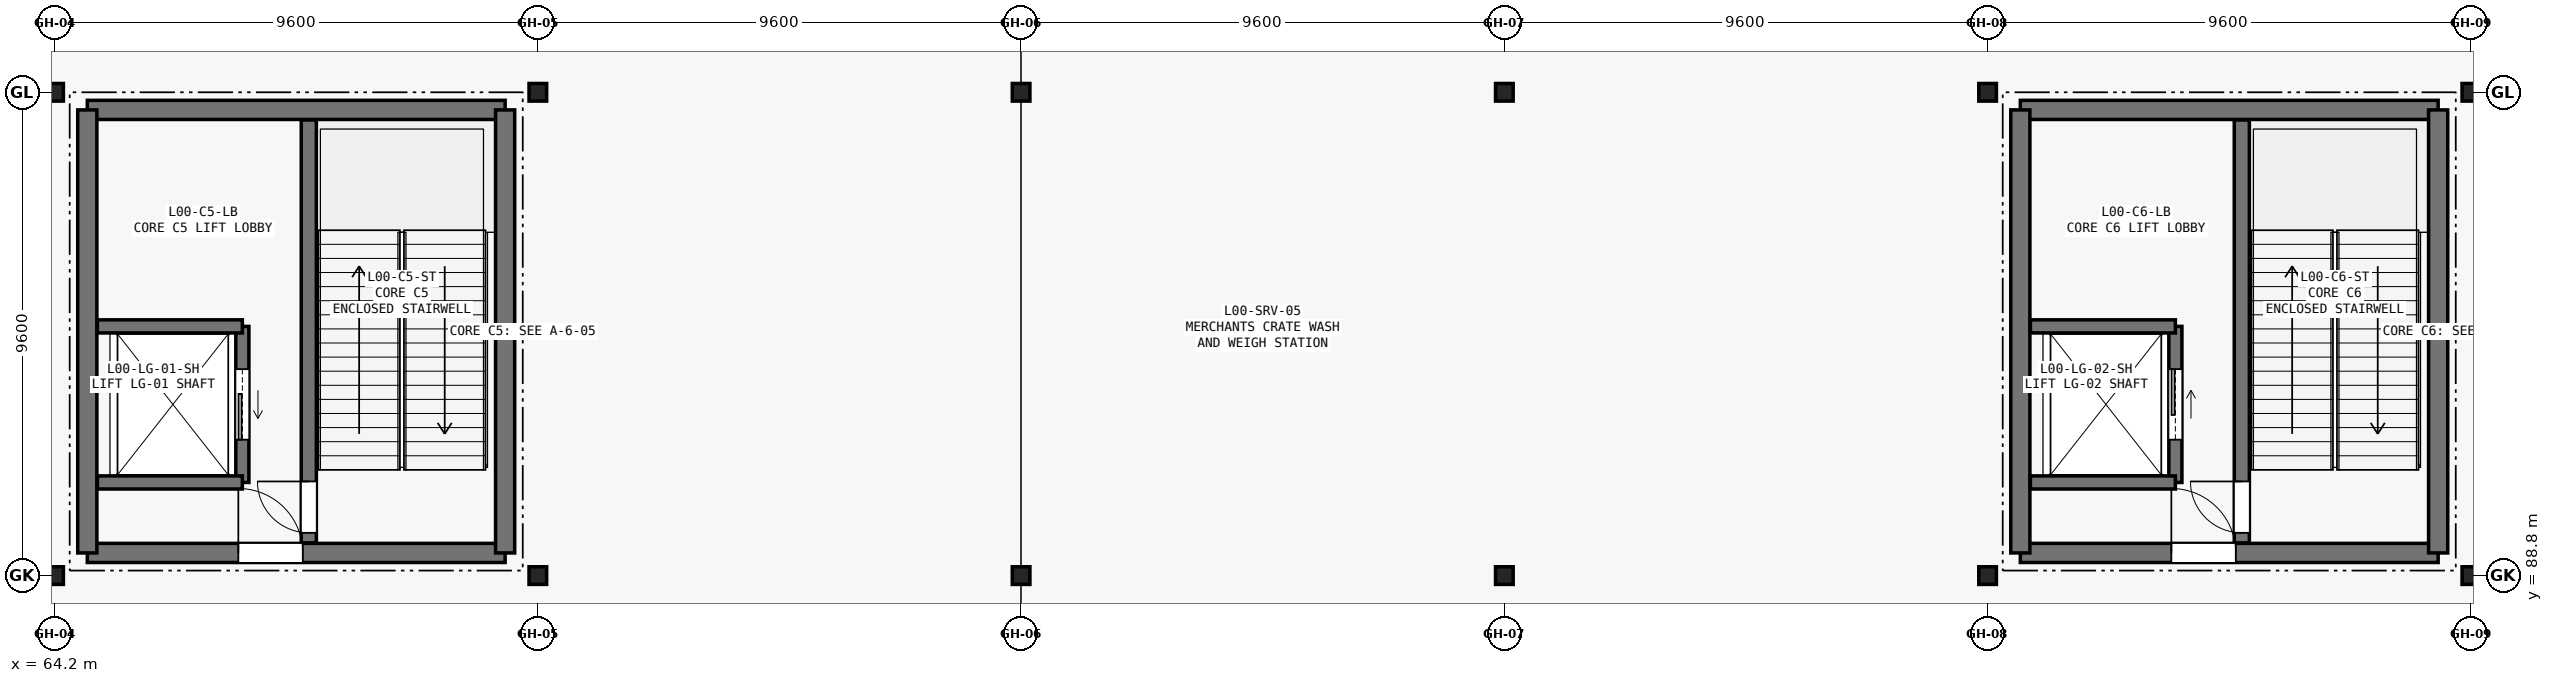
"""IFC4 building model, lengths in metres.
Left out: names, types, materials, properties, quantities, classifications, styles, units other than length and angle.
Written with IfcOpenShell. Run it as: python <this file> out.ifc"""

import sys

from ifc_helpers import new_model, si_unit, direction, frame, frame_2d, origin, origin_2d, place, context, subcontext, project, spatial, rectangle, hollow_rectangle, i_section, extrude, element, fill, save


model = new_model("IFC4")
c1 = context("Model", 3, precision=1e-05, world=origin(), true_north=direction((0.0, 1.0)))
c2 = subcontext(c1, "Body", "Model", "MODEL_VIEW")
j1 = project(units=[si_unit("LENGTHUNIT", "METRE"), si_unit("PLANEANGLEUNIT", "RADIAN")], contexts=[c1])
p1 = place(None, origin())
s1 = spatial("IfcSite", under=j1, at=p1, CompositionType="ELEMENT")
p2 = place(p1, origin())
s2 = spatial("IfcBuilding", under=s1, at=p2, CompositionType="ELEMENT")
p3 = place(p2, origin())
s3 = spatial("IfcBuildingStorey", under=s2, at=p3, CompositionType="ELEMENT", Elevation=0.0)
for number, where, z_axis, x_axis in (
    (1, (64.2, 88.8, 0.0), (0.0, 0.0, 1.0), (1.0, 0.0, 0.0)),
    (2, (64.2, 98.4, 0.0), (0.0, 0.0, 1.0), (1.0, 0.0, 0.0)),
    (3, (73.8, 88.8, 0.0), (0.0, 0.0, 1.0), (1.0, 0.0, 0.0)),
    (4, (73.8, 98.4, 0.0), (0.0, 0.0, 1.0), (1.0, 0.0, 0.0)),
):
    element("IfcColumn", number, at=place(p3, frame(where, z_axis=z_axis, x_axis=x_axis)), inside=s3, PredefinedType="COLUMN", context=c2, shape_type="SweptSolid", body=[
        extrude(i_section(OverallWidth=0.35, OverallDepth=0.35, WebThickness=0.012, FlangeThickness=0.019, FilletRadius=0.02, at=origin_2d()), origin(), (0.0, 0.0, 1.0), 6.0),
    ])
for number, where, z_axis, x_axis in (
    (5, (83.4, 88.8, 0.0), (0.0, 0.0, 1.0), (1.0, 0.0, 0.0)),
    (6, (83.4, 98.4, 0.0), (0.0, 0.0, 1.0), (1.0, 0.0, 0.0)),
    (7, (93.0, 88.8, 0.0), (0.0, 0.0, 1.0), (1.0, 0.0, 0.0)),
    (8, (93.0, 98.4, 0.0), (0.0, 0.0, 1.0), (1.0, 0.0, 0.0)),
    (9, (102.6, 88.8, 0.0), (0.0, 0.0, 1.0), (1.0, 0.0, 0.0)),
    (10, (102.6, 98.4, 0.0), (0.0, 0.0, 1.0), (1.0, 0.0, 0.0)),
):
    element("IfcColumn", number, at=place(p3, frame(where, z_axis=z_axis, x_axis=x_axis)), inside=s3, PredefinedType="COLUMN", context=c2, shape_type="SweptSolid", body=[
        extrude(hollow_rectangle(XDim=0.35, YDim=0.35, WallThickness=0.012, InnerFilletRadius=0.012, OuterFilletRadius=0.016, at=origin_2d()), origin(), (0.0, 0.0, 1.0), 6.0),
    ])
for number, where, z_axis, x_axis in (
    (11, (112.2, 88.8, 0.0), (0.0, 0.0, 1.0), (1.0, 0.0, 0.0)),
    (12, (112.2, 98.4, 0.0), (0.0, 0.0, 1.0), (1.0, 0.0, 0.0)),
):
    element("IfcColumn", number, at=place(p3, frame(where, z_axis=z_axis, x_axis=x_axis)), inside=s3, PredefinedType="COLUMN", context=c2, shape_type="SweptSolid", body=[
        extrude(i_section(OverallWidth=0.35, OverallDepth=0.35, WebThickness=0.012, FlangeThickness=0.019, FilletRadius=0.02, at=origin_2d()), origin(), (0.0, 0.0, 1.0), 6.0),
    ])
p4 = place(p3, frame((64.85, 89.25, 0.0), z_axis=(0.0, 0.0, 1.0), x_axis=(1.0, 0.0, 0.0)))
e13 = element("IfcWall", 13, at=p4, inside=s3, PredefinedType="SHEAR", context=c2, shape_type="SweptSolid", body=[
    extrude(rectangle(XDim=8.3, YDim=0.38, at=frame_2d((4.15, 0.0))), origin(), (0.0, 0.0, 1.0), 6.0),
])
p5 = place(p4, frame((3.0, 0.0, 0.0)))
e14 = element("IfcOpeningElement", 14, at=p5, cuts=e13, PredefinedType="OPENING", context=c2, shape_type="SweptSolid", body=[
    extrude(rectangle(XDim=1.28, YDim=2.15, at=frame_2d((0.64, 1.075))), frame((0.0, 0.2, 0.0), z_axis=(0.0, -1.0, 0.0), x_axis=(1.0, 0.0, 0.0)), (0.0, 0.0, 1.0), 0.4),
])
p6 = place(p3, frame((73.15, 98.05, 0.0), z_axis=(0.0, 0.0, 1.0), x_axis=(-1.0, 0.0, 0.0)))
e15 = element("IfcWall", 15, at=p6, inside=s3, PredefinedType="SHEAR", context=c2, shape_type="SweptSolid", body=[
    extrude(rectangle(XDim=8.3, YDim=0.38, at=frame_2d((4.15, 0.0))), origin(), (0.0, 0.0, 1.0), 6.0),
])
for number, where, z_axis, x_axis in (
    (16, (64.85, 98.05, 0.0), (0.0, 0.0, 1.0), (0.0, -1.0, 0.0)),
    (17, (73.15, 89.25, 0.0), (0.0, 0.0, 1.0), (0.0, 1.0, 0.0)),
):
    element("IfcWall", number, at=place(p3, frame(where, z_axis=z_axis, x_axis=x_axis)), inside=s3, PredefinedType="SHEAR", context=c2, shape_type="SweptSolid", body=[
        extrude(rectangle(XDim=8.8, YDim=0.38, at=frame_2d((4.4, 0.0))), origin(), (0.0, 0.0, 1.0), 6.0),
    ])
p7 = place(p3, frame((69.25, 89.45, 0.0), z_axis=(0.0, 0.0, 1.0), x_axis=(0.0, 1.0, 0.0)))
e18 = element("IfcWall", 18, at=p7, inside=s3, PredefinedType="SHEAR", context=c2, shape_type="SweptSolid", body=[
    extrude(rectangle(XDim=8.4, YDim=0.3, at=frame_2d((4.2, 0.0))), origin(), (0.0, 0.0, 1.0), 6.0),
])
p8 = place(p7, frame((0.2, 0.0, 0.0)))
e19 = element("IfcOpeningElement", 19, at=p8, cuts=e18, PredefinedType="OPENING", context=c2, shape_type="SweptSolid", body=[
    extrude(rectangle(XDim=1.02, YDim=2.1, at=frame_2d((0.51, 1.05))), frame((0.0, 0.16, 0.0), z_axis=(0.0, -1.0, 0.0), x_axis=(1.0, 0.0, 0.0)), (0.0, 0.0, 1.0), 0.32),
])
p9 = place(p3, frame((67.93, 90.65, 0.0), z_axis=(0.0, 0.0, 1.0), x_axis=(0.0, 1.0, 0.0)))
e20 = element("IfcWall", 20, at=p9, inside=s3, PredefinedType="SHEAR", context=c2, shape_type="SweptSolid", body=[
    extrude(rectangle(XDim=3.1, YDim=0.26, at=frame_2d((1.55, 0.0))), origin(), (0.0, 0.0, 1.0), 6.0),
])
p10 = place(p9, frame((0.85, 0.0, 0.0)))
e21 = element("IfcOpeningElement", 21, at=p10, cuts=e20, PredefinedType="OPENING", context=c2, shape_type="SweptSolid", body=[
    extrude(rectangle(XDim=1.4, YDim=2.25, at=frame_2d((0.7, 1.125))), frame((0.0, 0.14, 0.0), z_axis=(0.0, -1.0, 0.0), x_axis=(1.0, 0.0, 0.0)), (0.0, 0.0, 1.0), 0.28),
])
for number, where, z_axis, x_axis in (
    (22, (65.05, 90.65, 0.0), (0.0, 0.0, 1.0), (1.0, 0.0, 0.0)),
    (23, (65.05, 93.75, 0.0), (0.0, 0.0, 1.0), (1.0, 0.0, 0.0)),
):
    element("IfcWall", number, at=place(p3, frame(where, z_axis=z_axis, x_axis=x_axis)), inside=s3, PredefinedType="SHEAR", context=c2, shape_type="SweptSolid", body=[
        extrude(rectangle(XDim=2.88, YDim=0.26, at=frame_2d((1.44, 0.0))), origin(), (0.0, 0.0, 1.0), 6.0),
    ])
p11 = place(p3, frame((103.25, 89.25, 0.0), z_axis=(0.0, 0.0, 1.0), x_axis=(1.0, 0.0, 0.0)))
e24 = element("IfcWall", 24, at=p11, inside=s3, PredefinedType="SHEAR", context=c2, shape_type="SweptSolid", body=[
    extrude(rectangle(XDim=8.3, YDim=0.38, at=frame_2d((4.15, 0.0))), origin(), (0.0, 0.0, 1.0), 6.0),
])
p12 = place(p11, frame((3.0, 0.0, 0.0)))
e25 = element("IfcOpeningElement", 25, at=p12, cuts=e24, PredefinedType="OPENING", context=c2, shape_type="SweptSolid", body=[
    extrude(rectangle(XDim=1.28, YDim=2.15, at=frame_2d((0.64, 1.075))), frame((0.0, 0.2, 0.0), z_axis=(0.0, -1.0, 0.0), x_axis=(1.0, 0.0, 0.0)), (0.0, 0.0, 1.0), 0.4),
])
p13 = place(p3, frame((111.55, 98.05, 0.0), z_axis=(0.0, 0.0, 1.0), x_axis=(-1.0, 0.0, 0.0)))
e26 = element("IfcWall", 26, at=p13, inside=s3, PredefinedType="SHEAR", context=c2, shape_type="SweptSolid", body=[
    extrude(rectangle(XDim=8.3, YDim=0.38, at=frame_2d((4.15, 0.0))), origin(), (0.0, 0.0, 1.0), 6.0),
])
for number, where, z_axis, x_axis in (
    (27, (103.25, 98.05, 0.0), (0.0, 0.0, 1.0), (0.0, -1.0, 0.0)),
    (28, (111.55, 89.25, 0.0), (0.0, 0.0, 1.0), (0.0, 1.0, 0.0)),
):
    element("IfcWall", number, at=place(p3, frame(where, z_axis=z_axis, x_axis=x_axis)), inside=s3, PredefinedType="SHEAR", context=c2, shape_type="SweptSolid", body=[
        extrude(rectangle(XDim=8.8, YDim=0.38, at=frame_2d((4.4, 0.0))), origin(), (0.0, 0.0, 1.0), 6.0),
    ])
p14 = place(p3, frame((107.65, 89.45, 0.0), z_axis=(0.0, 0.0, 1.0), x_axis=(0.0, 1.0, 0.0)))
e29 = element("IfcWall", 29, at=p14, inside=s3, PredefinedType="SHEAR", context=c2, shape_type="SweptSolid", body=[
    extrude(rectangle(XDim=8.4, YDim=0.3, at=frame_2d((4.2, 0.0))), origin(), (0.0, 0.0, 1.0), 6.0),
])
p15 = place(p14, frame((0.2, 0.0, 0.0)))
e30 = element("IfcOpeningElement", 30, at=p15, cuts=e29, PredefinedType="OPENING", context=c2, shape_type="SweptSolid", body=[
    extrude(rectangle(XDim=1.02, YDim=2.1, at=frame_2d((0.51, 1.05))), frame((0.0, 0.16, 0.0), z_axis=(0.0, -1.0, 0.0), x_axis=(1.0, 0.0, 0.0)), (0.0, 0.0, 1.0), 0.32),
])
p16 = place(p3, frame((106.33, 90.65, 0.0), z_axis=(0.0, 0.0, 1.0), x_axis=(0.0, 1.0, 0.0)))
e31 = element("IfcWall", 31, at=p16, inside=s3, PredefinedType="SHEAR", context=c2, shape_type="SweptSolid", body=[
    extrude(rectangle(XDim=3.1, YDim=0.26, at=frame_2d((1.55, 0.0))), origin(), (0.0, 0.0, 1.0), 6.0),
])
p17 = place(p16, frame((0.85, 0.0, 0.0)))
e32 = element("IfcOpeningElement", 32, at=p17, cuts=e31, PredefinedType="OPENING", context=c2, shape_type="SweptSolid", body=[
    extrude(rectangle(XDim=1.4, YDim=2.25, at=frame_2d((0.7, 1.125))), frame((0.0, 0.14, 0.0), z_axis=(0.0, -1.0, 0.0), x_axis=(1.0, 0.0, 0.0)), (0.0, 0.0, 1.0), 0.28),
])
for number, where, z_axis, x_axis in (
    (33, (103.45, 90.65, 0.0), (0.0, 0.0, 1.0), (1.0, 0.0, 0.0)),
    (34, (103.45, 93.75, 0.0), (0.0, 0.0, 1.0), (1.0, 0.0, 0.0)),
):
    element("IfcWall", number, at=place(p3, frame(where, z_axis=z_axis, x_axis=x_axis)), inside=s3, PredefinedType="SHEAR", context=c2, shape_type="SweptSolid", body=[
        extrude(rectangle(XDim=2.88, YDim=0.26, at=frame_2d((1.44, 0.0))), origin(), (0.0, 0.0, 1.0), 6.0),
    ])
p18 = place(p5, origin())
e35 = element("IfcDoor", 35, at=p18, inside=s3, OperationType="SINGLE_SWING_LEFT", PredefinedType="DOOR", context=c2, shape_type="SweptSolid", body=[
    extrude(rectangle(XDim=1.28, YDim=2.15, at=frame_2d((0.64, 1.075))), frame((0.0, 0.025, 0.0), z_axis=(0.0, -1.0, 0.0), x_axis=(1.0, 0.0, 0.0)), (0.0, 0.0, 1.0), 0.05),
])
fill(e14, e35)
p19 = place(p8, origin())
e36 = element("IfcDoor", 36, at=p19, inside=s3, OperationType="SINGLE_SWING_RIGHT", PredefinedType="DOOR", context=c2, shape_type="SweptSolid", body=[
    extrude(rectangle(XDim=1.02, YDim=2.1, at=frame_2d((0.51, 1.05))), frame((0.0, 0.025, 0.0), z_axis=(0.0, -1.0, 0.0), x_axis=(1.0, 0.0, 0.0)), (0.0, 0.0, 1.0), 0.05),
])
fill(e19, e36)
p20 = place(p10, origin())
e37 = element("IfcDoor", 37, at=p20, inside=s3, OperationType="SLIDING_TO_LEFT", PredefinedType="DOOR", context=c2, shape_type="SweptSolid", body=[
    extrude(rectangle(XDim=1.4, YDim=2.25, at=frame_2d((0.7, 1.125))), frame((0.0, 0.025, 0.0), z_axis=(0.0, -1.0, 0.0), x_axis=(1.0, 0.0, 0.0)), (0.0, 0.0, 1.0), 0.05),
])
fill(e21, e37)
p21 = place(p12, origin())
e38 = element("IfcDoor", 38, at=p21, inside=s3, OperationType="SINGLE_SWING_LEFT", PredefinedType="DOOR", context=c2, shape_type="SweptSolid", body=[
    extrude(rectangle(XDim=1.28, YDim=2.15, at=frame_2d((0.64, 1.075))), frame((0.0, 0.025, 0.0), z_axis=(0.0, -1.0, 0.0), x_axis=(1.0, 0.0, 0.0)), (0.0, 0.0, 1.0), 0.05),
])
fill(e25, e38)
p22 = place(p15, origin())
e39 = element("IfcDoor", 39, at=p22, inside=s3, OperationType="SINGLE_SWING_RIGHT", PredefinedType="DOOR", context=c2, shape_type="SweptSolid", body=[
    extrude(rectangle(XDim=1.02, YDim=2.1, at=frame_2d((0.51, 1.05))), frame((0.0, 0.025, 0.0), z_axis=(0.0, -1.0, 0.0), x_axis=(1.0, 0.0, 0.0)), (0.0, 0.0, 1.0), 0.05),
])
fill(e30, e39)
p23 = place(p17, origin())
e40 = element("IfcDoor", 40, at=p23, inside=s3, OperationType="SLIDING_TO_RIGHT", PredefinedType="DOOR", context=c2, shape_type="SweptSolid", body=[
    extrude(rectangle(XDim=1.4, YDim=2.25, at=frame_2d((0.7, 1.125))), frame((0.0, 0.025, 0.0), z_axis=(0.0, -1.0, 0.0), x_axis=(1.0, 0.0, 0.0)), (0.0, 0.0, 1.0), 0.05),
])
fill(e32, e40)
save(model, sys.argv[1])
